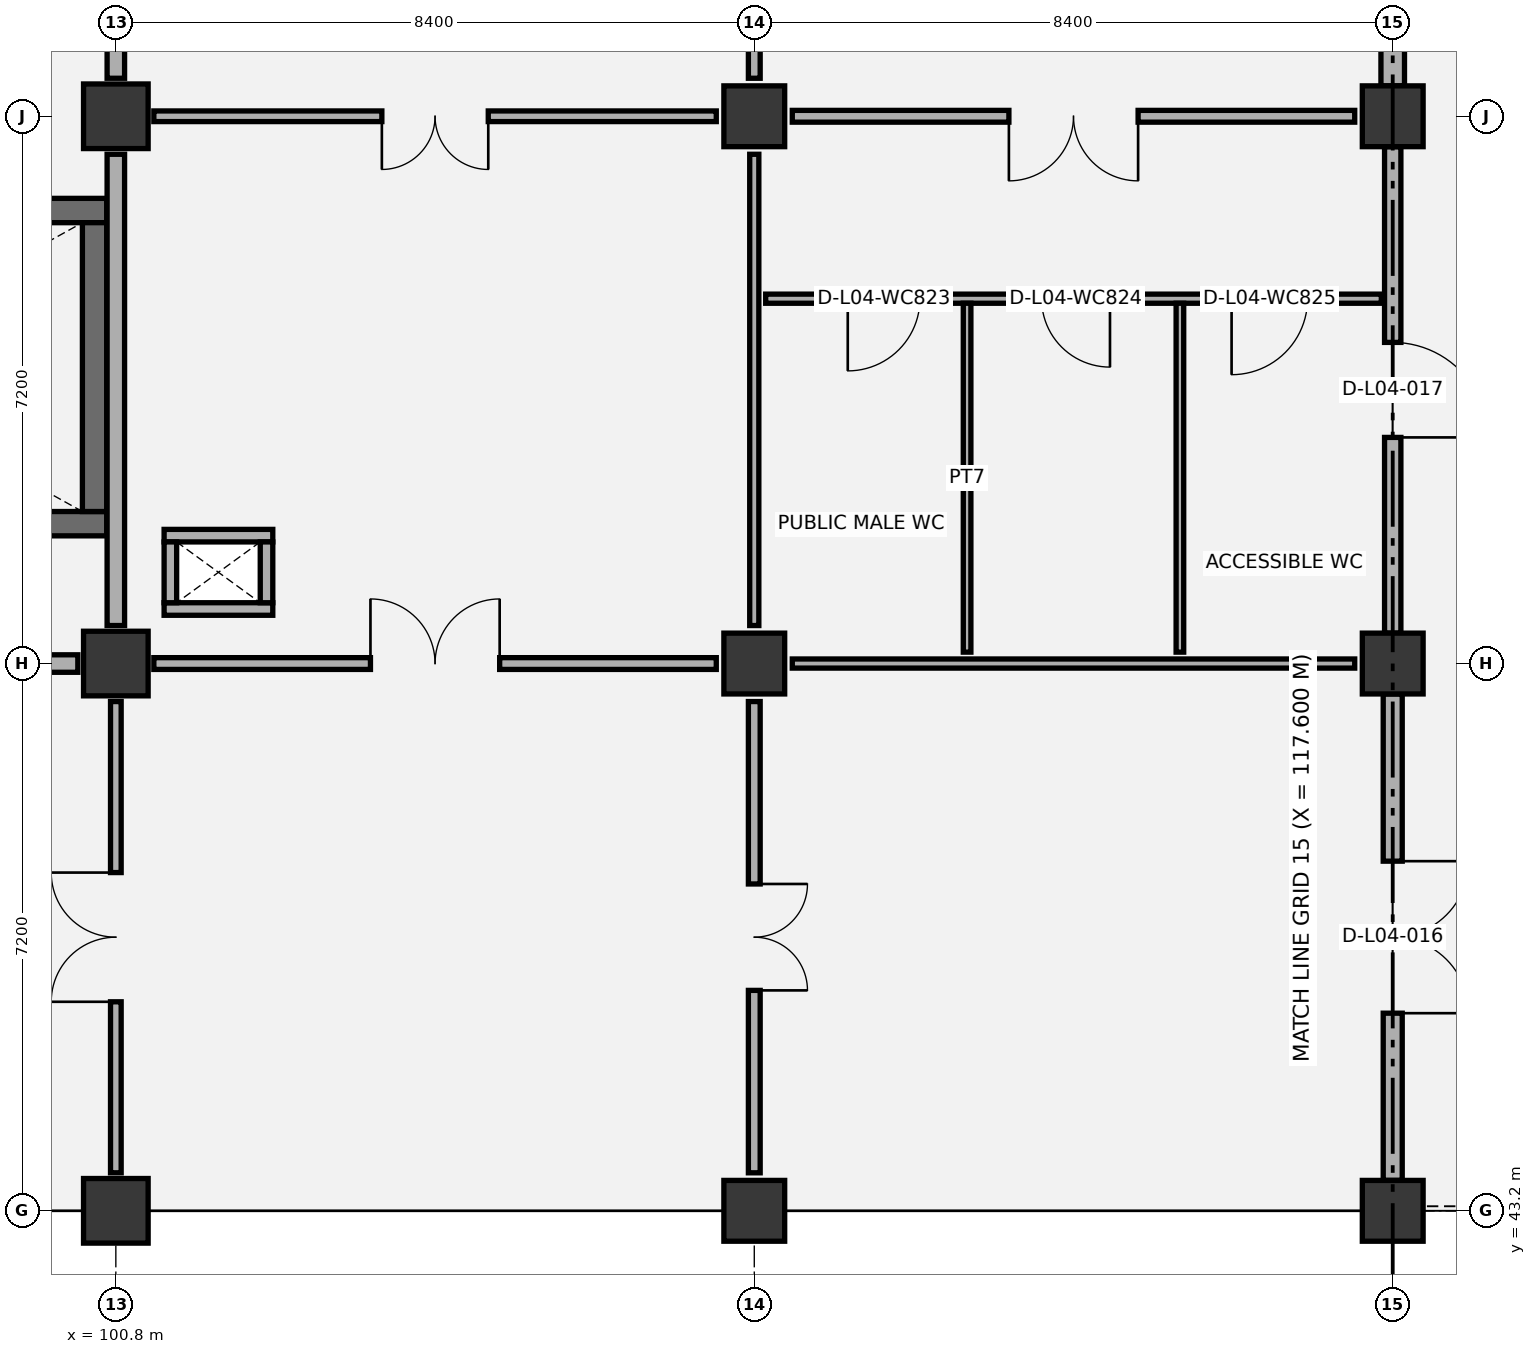
"""IFC4 building model, lengths in metres.
Left out: names, types, materials, properties, quantities, classifications, styles, units other than length and angle.
Written with IfcOpenShell. Run it as: python <this file> out.ifc"""

import sys

from ifc_helpers import new_model, si_unit, direction, frame, frame_2d, origin, origin_2d, place, context, subcontext, project, spatial, rectangle, extrude, element, fill, save


model = new_model("IFC4")
c1 = context("Model", 3, precision=1e-05, world=origin(), true_north=direction((0.0, 1.0)))
c2 = subcontext(c1, "Body", "Model", "MODEL_VIEW")
j1 = project(units=[si_unit("LENGTHUNIT", "METRE"), si_unit("PLANEANGLEUNIT", "RADIAN")], contexts=[c1])
p1 = place(None, origin())
s1 = spatial("IfcSite", under=j1, at=p1, CompositionType="ELEMENT")
p2 = place(p1, origin())
s2 = spatial("IfcBuilding", under=s1, at=p2, CompositionType="ELEMENT")
p3 = place(p2, frame((0.0, 0.0, 22.2)))
s3 = spatial("IfcBuildingStorey", under=s2, at=p3, CompositionType="ELEMENT", Elevation=22.2)
for number, where, z_axis, x_axis in (
    (1, (100.8, 43.2, 0.0), (0.0, 0.0, 1.0), (1.0, 0.0, 0.0)),
    (2, (100.8, 50.4, 0.0), (0.0, 0.0, 1.0), (1.0, 0.0, 0.0)),
    (3, (100.8, 57.6, 0.0), (0.0, 0.0, 1.0), (1.0, 0.0, 0.0)),
):
    element("IfcColumn", number, at=place(p3, frame(where, z_axis=z_axis, x_axis=x_axis)), inside=s3, PredefinedType="COLUMN", context=c2, shape_type="SweptSolid", body=[
        extrude(rectangle(XDim=0.85, YDim=0.85, at=origin_2d()), origin(), (0.0, 0.0, 1.0), 4.8),
    ])
for number, where, z_axis, x_axis in (
    (4, (109.2, 43.2, 0.0), (0.0, 0.0, 1.0), (1.0, 0.0, 0.0)),
    (5, (109.2, 50.4, 0.0), (0.0, 0.0, 1.0), (1.0, 0.0, 0.0)),
    (6, (109.2, 57.6, 0.0), (0.0, 0.0, 1.0), (1.0, 0.0, 0.0)),
    (7, (117.6, 43.2, 0.0), (0.0, 0.0, 1.0), (1.0, 0.0, 0.0)),
    (8, (117.6, 50.4, 0.0), (0.0, 0.0, 1.0), (1.0, 0.0, 0.0)),
    (9, (117.6, 57.6, 0.0), (0.0, 0.0, 1.0), (1.0, 0.0, 0.0)),
):
    element("IfcColumn", number, at=place(p3, frame(where, z_axis=z_axis, x_axis=x_axis)), inside=s3, PredefinedType="COLUMN", context=c2, shape_type="SweptSolid", body=[
        extrude(rectangle(XDim=0.8, YDim=0.8, at=origin_2d()), origin(), (0.0, 0.0, 1.0), 4.8),
    ])
p4 = place(p3, frame((93.2, 52.24, 0.0), z_axis=(0.0, 0.0, 1.0), x_axis=(1.0, 0.0, 0.0)))
e10 = element("IfcWall", 10, at=p4, inside=s3, PredefinedType="SHEAR", context=c2, shape_type="SweptSolid", body=[
    extrude(rectangle(XDim=7.48, YDim=0.32, at=frame_2d((3.74, 0.0))), origin(), (0.0, 0.0, 1.0), 4.52),
])
p5 = place(p4, frame((0.45, 0.0, 0.0)))
e11 = element("IfcOpeningElement", 11, at=p5, cuts=e10, PredefinedType="OPENING", context=c2, shape_type="SweptSolid", body=[
    extrude(rectangle(XDim=1.05, YDim=2.15, at=frame_2d((0.525, 1.075))), frame((0.0, 0.17, 0.0), z_axis=(0.0, -1.0, 0.0), x_axis=(1.0, 0.0, 0.0)), (0.0, 0.0, 1.0), 0.34),
])
p6 = place(p3, frame((93.2, 56.36, 0.0), z_axis=(0.0, 0.0, 1.0), x_axis=(1.0, 0.0, 0.0)))
e12 = element("IfcWall", 12, at=p6, inside=s3, PredefinedType="SHEAR", context=c2, shape_type="SweptSolid", body=[
    extrude(rectangle(XDim=7.48, YDim=0.32, at=frame_2d((3.74, 0.0))), origin(), (0.0, 0.0, 1.0), 4.52),
])
p7 = place(p3, frame((100.52, 52.4, 0.0), z_axis=(0.0, 0.0, 1.0), x_axis=(0.0, 1.0, 0.0)))
e13 = element("IfcWall", 13, at=p7, inside=s3, PredefinedType="SHEAR", context=c2, shape_type="SweptSolid", body=[
    extrude(rectangle(XDim=3.8, YDim=0.32, at=frame_2d((1.9, 0.0))), origin(), (0.0, 0.0, 1.0), 4.52),
])
p8 = place(p3, frame((117.6, 43.6, 0.0), z_axis=(0.0, 0.0, 1.0), x_axis=(0.0, 1.0, 0.0)))
e14 = element("IfcWall", 14, at=p8, inside=s3, PredefinedType="SOLIDWALL", context=c2, shape_type="SweptSolid", body=[
    extrude(rectangle(XDim=6.4, YDim=0.25, at=frame_2d((3.2, 0.0))), origin(), (0.0, 0.0, 1.0), 3.865),
])
p9 = place(p8, frame((2.2, 0.0, 0.0)))
e15 = element("IfcOpeningElement", 15, at=p9, cuts=e14, PredefinedType="OPENING", context=c2, shape_type="SweptSolid", body=[
    extrude(rectangle(XDim=2.0, YDim=2.4, at=frame_2d((1.0, 1.2))), frame((0.0, 0.135, 0.0), z_axis=(0.0, -1.0, 0.0), x_axis=(1.0, 0.0, 0.0)), (0.0, 0.0, 1.0), 0.27),
])
p10 = place(p3, frame((117.6, 50.8, 0.0), z_axis=(0.0, 0.0, 1.0), x_axis=(0.0, 1.0, 0.0)))
e16 = element("IfcWall", 16, at=p10, inside=s3, PredefinedType="SOLIDWALL", context=c2, shape_type="SweptSolid", body=[
    extrude(rectangle(XDim=6.4, YDim=0.215, at=frame_2d((3.2, 0.0))), origin(), (0.0, 0.0, 1.0), 3.865),
])
p11 = place(p10, frame((2.575, 0.0, 0.0)))
e17 = element("IfcOpeningElement", 17, at=p11, cuts=e16, PredefinedType="OPENING", context=c2, shape_type="SweptSolid", body=[
    extrude(rectangle(XDim=1.25, YDim=2.15, at=frame_2d((0.625, 1.075))), frame((0.0, 0.117, 0.0), z_axis=(0.0, -1.0, 0.0), x_axis=(1.0, 0.0, 0.0)), (0.0, 0.0, 1.0), 0.235),
])
p12 = place(p3, frame((117.6, 58.0, 0.0), z_axis=(0.0, 0.0, 1.0), x_axis=(0.0, 1.0, 0.0)))
e18 = element("IfcWall", 18, at=p12, inside=s3, PredefinedType="SOLIDWALL", context=c2, shape_type="SweptSolid", body=[
    extrude(rectangle(XDim=6.4, YDim=0.31, at=frame_2d((3.2, 0.0))), origin(), (0.0, 0.0, 1.0), 3.865),
])
for number, where, z_axis, x_axis in (
    (19, (101.435, 51.117, 0.0), (0.0, 0.0, 1.0), (1.0, 0.0, 0.0)),
    (20, (101.435, 52.083, 0.0), (0.0, 0.0, 1.0), (1.0, 0.0, 0.0)),
):
    element("IfcWall", number, at=place(p3, frame(where, z_axis=z_axis, x_axis=x_axis)), inside=s3, PredefinedType="PARTITIONING", context=c2, shape_type="SweptSolid", body=[
        extrude(rectangle(XDim=1.43, YDim=0.165, at=frame_2d((0.715, 0.0))), origin(), (0.0, 0.0, 1.0), 4.52),
    ])
for number, where, z_axis, x_axis in (
    (21, (101.518, 51.2, 0.0), (0.0, 0.0, 1.0), (0.0, 1.0, 0.0)),
    (22, (102.782, 51.2, 0.0), (0.0, 0.0, 1.0), (0.0, 1.0, 0.0)),
):
    element("IfcWall", number, at=place(p3, frame(where, z_axis=z_axis, x_axis=x_axis)), inside=s3, PredefinedType="PARTITIONING", context=c2, shape_type="SweptSolid", body=[
        extrude(rectangle(XDim=0.8, YDim=0.165, at=frame_2d((0.4, 0.0))), origin(), (0.0, 0.0, 1.0), 4.52),
    ])
p13 = place(p3, frame((109.35, 55.2, 0.0), z_axis=(0.0, 0.0, 1.0), x_axis=(1.0, 0.0, 0.0)))
e23 = element("IfcWall", 23, at=p13, inside=s3, PredefinedType="PARTITIONING", context=c2, shape_type="SweptSolid", body=[
    extrude(rectangle(XDim=8.1, YDim=0.12, at=frame_2d((4.05, 0.0))), origin(), (0.0, 0.0, 1.0), 4.52),
])
p14 = place(p13, frame((1.08, 0.0, 0.0)))
e24 = element("IfcOpeningElement", 24, at=p14, cuts=e23, PredefinedType="OPENING", context=c2, shape_type="SweptSolid", body=[
    extrude(rectangle(XDim=0.95, YDim=2.1, at=frame_2d((0.475, 1.05))), frame((0.0, 0.07, 0.0), z_axis=(0.0, -1.0, 0.0), x_axis=(1.0, 0.0, 0.0)), (0.0, 0.0, 1.0), 0.14),
])
p15 = place(p13, frame((3.63, 0.0, 0.0)))
e25 = element("IfcOpeningElement", 25, at=p15, cuts=e23, PredefinedType="OPENING", context=c2, shape_type="SweptSolid", body=[
    extrude(rectangle(XDim=0.9, YDim=2.1, at=frame_2d((0.45, 1.05))), frame((0.0, 0.07, 0.0), z_axis=(0.0, -1.0, 0.0), x_axis=(1.0, 0.0, 0.0)), (0.0, 0.0, 1.0), 0.14),
])
p16 = place(p13, frame((6.13, 0.0, 0.0)))
e26 = element("IfcOpeningElement", 26, at=p16, cuts=e23, PredefinedType="OPENING", context=c2, shape_type="SweptSolid", body=[
    extrude(rectangle(XDim=1.0, YDim=2.1, at=frame_2d((0.5, 1.05))), frame((0.0, 0.07, 0.0), z_axis=(0.0, -1.0, 0.0), x_axis=(1.0, 0.0, 0.0)), (0.0, 0.0, 1.0), 0.14),
])
for number, where, z_axis, x_axis in (
    (27, (112.0, 50.55, 0.0), (0.0, 0.0, 1.0), (0.0, 1.0, 0.0)),
    (28, (114.8, 50.55, 0.0), (0.0, 0.0, 1.0), (0.0, 1.0, 0.0)),
):
    element("IfcWall", number, at=place(p3, frame(where, z_axis=z_axis, x_axis=x_axis)), inside=s3, PredefinedType="PARTITIONING", context=c2, shape_type="SweptSolid", body=[
        extrude(rectangle(XDim=4.59, YDim=0.1, at=frame_2d((2.295, 0.0))), origin(), (0.0, 0.0, 1.0), 4.52),
    ])
p17 = place(p3, frame((100.8, 43.7, 0.0), z_axis=(0.0, 0.0, 1.0), x_axis=(0.0, 1.0, 0.0)))
e29 = element("IfcWall", 29, at=p17, inside=s3, PredefinedType="PARTITIONING", context=c2, shape_type="SweptSolid", body=[
    extrude(rectangle(XDim=6.2, YDim=0.14, at=frame_2d((3.1, 0.0))), origin(), (0.0, 0.0, 1.0), 4.015),
])
p18 = place(p17, frame((2.25, 0.0, 0.0)))
e30 = element("IfcOpeningElement", 30, at=p18, cuts=e29, PredefinedType="OPENING", context=c2, shape_type="SweptSolid", body=[
    extrude(rectangle(XDim=1.7, YDim=2.25, at=frame_2d((0.85, 1.125))), frame((0.0, 0.08, 0.0), z_axis=(0.0, -1.0, 0.0), x_axis=(1.0, 0.0, 0.0)), (0.0, 0.0, 1.0), 0.16),
])
p19 = place(p3, frame((92.9, 50.4, 0.0), z_axis=(0.0, 0.0, 1.0), x_axis=(1.0, 0.0, 0.0)))
e31 = element("IfcWall", 31, at=p19, inside=s3, PredefinedType="PARTITIONING", context=c2, shape_type="SweptSolid", body=[
    extrude(rectangle(XDim=7.4, YDim=0.23, at=frame_2d((3.7, 0.0))), origin(), (0.0, 0.0, 1.0), 3.815),
])
p20 = place(p19, frame((2.95, 0.0, 0.0)))
e32 = element("IfcOpeningElement", 32, at=p20, cuts=e31, PredefinedType="OPENING", context=c2, shape_type="SweptSolid", body=[
    extrude(rectangle(XDim=1.5, YDim=2.15, at=frame_2d((0.75, 1.075))), frame((0.0, 0.125, 0.0), z_axis=(0.0, -1.0, 0.0), x_axis=(1.0, 0.0, 0.0)), (0.0, 0.0, 1.0), 0.25),
])
p21 = place(p3, frame((100.8, 50.9, 0.0), z_axis=(0.0, 0.0, 1.0), x_axis=(0.0, 1.0, 0.0)))
e33 = element("IfcWall", 33, at=p21, inside=s3, PredefinedType="PARTITIONING", context=c2, shape_type="SweptSolid", body=[
    extrude(rectangle(XDim=6.2, YDim=0.23, at=frame_2d((3.1, 0.0))), origin(), (0.0, 0.0, 1.0), 3.865),
])
p22 = place(p3, frame((100.8, 58.1, 0.0), z_axis=(0.0, 0.0, 1.0), x_axis=(0.0, 1.0, 0.0)))
e34 = element("IfcWall", 34, at=p22, inside=s3, PredefinedType="PARTITIONING", context=c2, shape_type="SweptSolid", body=[
    extrude(rectangle(XDim=6.2, YDim=0.23, at=frame_2d((3.1, 0.0))), origin(), (0.0, 0.0, 1.0), 4.115),
])
p23 = place(p3, frame((109.2, 43.7, 0.0), z_axis=(0.0, 0.0, 1.0), x_axis=(0.0, 1.0, 0.0)))
e35 = element("IfcWall", 35, at=p23, inside=s3, PredefinedType="PARTITIONING", context=c2, shape_type="SweptSolid", body=[
    extrude(rectangle(XDim=6.2, YDim=0.155, at=frame_2d((3.1, 0.0))), origin(), (0.0, 0.0, 1.0), 3.865),
])
p24 = place(p23, frame((2.4, 0.0, 0.0)))
e36 = element("IfcOpeningElement", 36, at=p24, cuts=e35, PredefinedType="OPENING", context=c2, shape_type="SweptSolid", body=[
    extrude(rectangle(XDim=1.4, YDim=2.15, at=frame_2d((0.7, 1.075))), frame((0.0, 0.087, 0.0), z_axis=(0.0, -1.0, 0.0), x_axis=(1.0, 0.0, 0.0)), (0.0, 0.0, 1.0), 0.175),
])
p25 = place(p3, frame((101.3, 50.4, 0.0), z_axis=(0.0, 0.0, 1.0), x_axis=(1.0, 0.0, 0.0)))
e37 = element("IfcWall", 37, at=p25, inside=s3, PredefinedType="PARTITIONING", context=c2, shape_type="SweptSolid", body=[
    extrude(rectangle(XDim=7.4, YDim=0.155, at=frame_2d((3.7, 0.0))), origin(), (0.0, 0.0, 1.0), 3.815),
])
p26 = place(p25, frame((2.85, 0.0, 0.0)))
e38 = element("IfcOpeningElement", 38, at=p26, cuts=e37, PredefinedType="OPENING", context=c2, shape_type="SweptSolid", body=[
    extrude(rectangle(XDim=1.7, YDim=2.25, at=frame_2d((0.85, 1.125))), frame((0.0, 0.087, 0.0), z_axis=(0.0, -1.0, 0.0), x_axis=(1.0, 0.0, 0.0)), (0.0, 0.0, 1.0), 0.175),
])
p27 = place(p3, frame((109.2, 50.9, 0.0), z_axis=(0.0, 0.0, 1.0), x_axis=(0.0, 1.0, 0.0)))
e39 = element("IfcWall", 39, at=p27, inside=s3, PredefinedType="PARTITIONING", context=c2, shape_type="SweptSolid", body=[
    extrude(rectangle(XDim=6.2, YDim=0.12, at=frame_2d((3.1, 0.0))), origin(), (0.0, 0.0, 1.0), 4.115),
])
p28 = place(p3, frame((101.3, 57.6, 0.0), z_axis=(0.0, 0.0, 1.0), x_axis=(1.0, 0.0, 0.0)))
e40 = element("IfcWall", 40, at=p28, inside=s3, PredefinedType="PARTITIONING", context=c2, shape_type="SweptSolid", body=[
    extrude(rectangle(XDim=7.4, YDim=0.14, at=frame_2d((3.7, 0.0))), origin(), (0.0, 0.0, 1.0), 3.815),
])
p29 = place(p28, frame((3.0, 0.0, 0.0)))
e41 = element("IfcOpeningElement", 41, at=p29, cuts=e40, PredefinedType="OPENING", context=c2, shape_type="SweptSolid", body=[
    extrude(rectangle(XDim=1.4, YDim=2.15, at=frame_2d((0.7, 1.075))), frame((0.0, 0.08, 0.0), z_axis=(0.0, -1.0, 0.0), x_axis=(1.0, 0.0, 0.0)), (0.0, 0.0, 1.0), 0.16),
])
p30 = place(p3, frame((109.2, 58.1, 0.0), z_axis=(0.0, 0.0, 1.0), x_axis=(0.0, 1.0, 0.0)))
e42 = element("IfcWall", 42, at=p30, inside=s3, PredefinedType="PARTITIONING", context=c2, shape_type="SweptSolid", body=[
    extrude(rectangle(XDim=6.2, YDim=0.155, at=frame_2d((3.1, 0.0))), origin(), (0.0, 0.0, 1.0), 3.865),
])
p31 = place(p30, frame((2.25, 0.0, 0.0)))
e43 = element("IfcOpeningElement", 43, at=p31, cuts=e42, PredefinedType="OPENING", context=c2, shape_type="SweptSolid", body=[
    extrude(rectangle(XDim=1.7, YDim=2.25, at=frame_2d((0.85, 1.125))), frame((0.0, 0.087, 0.0), z_axis=(0.0, -1.0, 0.0), x_axis=(1.0, 0.0, 0.0)), (0.0, 0.0, 1.0), 0.175),
])
p32 = place(p3, frame((109.7, 50.4, 0.0), z_axis=(0.0, 0.0, 1.0), x_axis=(1.0, 0.0, 0.0)))
e44 = element("IfcWall", 44, at=p32, inside=s3, PredefinedType="PARTITIONING", context=c2, shape_type="SweptSolid", body=[
    extrude(rectangle(XDim=7.4, YDim=0.12, at=frame_2d((3.7, 0.0))), origin(), (0.0, 0.0, 1.0), 3.815),
])
p33 = place(p3, frame((109.7, 57.6, 0.0), z_axis=(0.0, 0.0, 1.0), x_axis=(1.0, 0.0, 0.0)))
e45 = element("IfcWall", 45, at=p33, inside=s3, PredefinedType="PARTITIONING", context=c2, shape_type="SweptSolid", body=[
    extrude(rectangle(XDim=7.4, YDim=0.155, at=frame_2d((3.7, 0.0))), origin(), (0.0, 0.0, 1.0), 3.815),
])
p34 = place(p33, frame((2.85, 0.0, 0.0)))
e46 = element("IfcOpeningElement", 46, at=p34, cuts=e45, PredefinedType="OPENING", context=c2, shape_type="SweptSolid", body=[
    extrude(rectangle(XDim=1.7, YDim=2.25, at=frame_2d((0.85, 1.125))), frame((0.0, 0.087, 0.0), z_axis=(0.0, -1.0, 0.0), x_axis=(1.0, 0.0, 0.0)), (0.0, 0.0, 1.0), 0.175),
])
p35 = place(p9, frame((2.0, 0.0, 0.0), z_axis=(0.0, 0.0, 1.0), x_axis=(-1.0, 0.0, 0.0)))
e47 = element("IfcDoor", 47, at=p35, inside=s3, OperationType="DOUBLE_DOOR_SINGLE_SWING", PredefinedType="DOOR", context=c2, shape_type="SweptSolid", body=[
    extrude(rectangle(XDim=2.0, YDim=2.4, at=frame_2d((1.0, 1.2))), frame((0.0, 0.025, 0.0), z_axis=(0.0, -1.0, 0.0), x_axis=(1.0, 0.0, 0.0)), (0.0, 0.0, 1.0), 0.05),
])
fill(e15, e47)
p36 = place(p11, frame((1.25, 0.0, 0.0), z_axis=(0.0, 0.0, 1.0), x_axis=(-1.0, 0.0, 0.0)))
e48 = element("IfcDoor", 48, at=p36, inside=s3, OperationType="SINGLE_SWING_RIGHT", PredefinedType="DOOR", context=c2, shape_type="SweptSolid", body=[
    extrude(rectangle(XDim=1.25, YDim=2.15, at=frame_2d((0.625, 1.075))), frame((0.0, 0.025, 0.0), z_axis=(0.0, -1.0, 0.0), x_axis=(1.0, 0.0, 0.0)), (0.0, 0.0, 1.0), 0.05),
])
fill(e17, e48)
p37 = place(p14, frame((0.95, 0.0, 0.0), z_axis=(0.0, 0.0, 1.0), x_axis=(-1.0, 0.0, 0.0)))
e49 = element("IfcDoor", 49, at=p37, inside=s3, OperationType="SINGLE_SWING_RIGHT", PredefinedType="DOOR", context=c2, shape_type="SweptSolid", body=[
    extrude(rectangle(XDim=0.95, YDim=2.1, at=frame_2d((0.475, 1.05))), frame((0.0, 0.025, 0.0), z_axis=(0.0, -1.0, 0.0), x_axis=(1.0, 0.0, 0.0)), (0.0, 0.0, 1.0), 0.05),
])
fill(e24, e49)
p38 = place(p15, frame((0.9, 0.0, 0.0), z_axis=(0.0, 0.0, 1.0), x_axis=(-1.0, 0.0, 0.0)))
e50 = element("IfcDoor", 50, at=p38, inside=s3, OperationType="SINGLE_SWING_LEFT", PredefinedType="DOOR", context=c2, shape_type="SweptSolid", body=[
    extrude(rectangle(XDim=0.9, YDim=2.1, at=frame_2d((0.45, 1.05))), frame((0.0, 0.025, 0.0), z_axis=(0.0, -1.0, 0.0), x_axis=(1.0, 0.0, 0.0)), (0.0, 0.0, 1.0), 0.05),
])
fill(e25, e50)
p39 = place(p16, frame((1.0, 0.0, 0.0), z_axis=(0.0, 0.0, 1.0), x_axis=(-1.0, 0.0, 0.0)))
e51 = element("IfcDoor", 51, at=p39, inside=s3, OperationType="SINGLE_SWING_RIGHT", PredefinedType="DOOR", context=c2, shape_type="SweptSolid", body=[
    extrude(rectangle(XDim=1.0, YDim=2.1, at=frame_2d((0.5, 1.05))), frame((0.0, 0.025, 0.0), z_axis=(0.0, -1.0, 0.0), x_axis=(1.0, 0.0, 0.0)), (0.0, 0.0, 1.0), 0.05),
])
fill(e26, e51)
p40 = place(p18, origin())
e52 = element("IfcDoor", 52, at=p40, inside=s3, OperationType="DOUBLE_DOOR_SINGLE_SWING", PredefinedType="DOOR", context=c2, shape_type="SweptSolid", body=[
    extrude(rectangle(XDim=1.7, YDim=2.25, at=frame_2d((0.85, 1.125))), frame((0.0, 0.025, 0.0), z_axis=(0.0, -1.0, 0.0), x_axis=(1.0, 0.0, 0.0)), (0.0, 0.0, 1.0), 0.05),
])
fill(e30, e52)
p41 = place(p24, frame((1.4, 0.0, 0.0), z_axis=(0.0, 0.0, 1.0), x_axis=(-1.0, 0.0, 0.0)))
e53 = element("IfcDoor", 53, at=p41, inside=s3, OperationType="DOUBLE_DOOR_SINGLE_SWING", PredefinedType="DOOR", context=c2, shape_type="SweptSolid", body=[
    extrude(rectangle(XDim=1.4, YDim=2.15, at=frame_2d((0.7, 1.075))), frame((0.0, 0.025, 0.0), z_axis=(0.0, -1.0, 0.0), x_axis=(1.0, 0.0, 0.0)), (0.0, 0.0, 1.0), 0.05),
])
fill(e36, e53)
p42 = place(p26, origin())
e54 = element("IfcDoor", 54, at=p42, inside=s3, OperationType="DOUBLE_DOOR_SINGLE_SWING", PredefinedType="DOOR", context=c2, shape_type="SweptSolid", body=[
    extrude(rectangle(XDim=1.7, YDim=2.25, at=frame_2d((0.85, 1.125))), frame((0.0, 0.025, 0.0), z_axis=(0.0, -1.0, 0.0), x_axis=(1.0, 0.0, 0.0)), (0.0, 0.0, 1.0), 0.05),
])
fill(e38, e54)
p43 = place(p29, frame((1.4, 0.0, 0.0), z_axis=(0.0, 0.0, 1.0), x_axis=(-1.0, 0.0, 0.0)))
e55 = element("IfcDoor", 55, at=p43, inside=s3, OperationType="DOUBLE_DOOR_SINGLE_SWING", PredefinedType="DOOR", context=c2, shape_type="SweptSolid", body=[
    extrude(rectangle(XDim=1.4, YDim=2.15, at=frame_2d((0.7, 1.075))), frame((0.0, 0.025, 0.0), z_axis=(0.0, -1.0, 0.0), x_axis=(1.0, 0.0, 0.0)), (0.0, 0.0, 1.0), 0.05),
])
fill(e41, e55)
p44 = place(p34, frame((1.7, 0.0, 0.0), z_axis=(0.0, 0.0, 1.0), x_axis=(-1.0, 0.0, 0.0)))
e56 = element("IfcDoor", 56, at=p44, inside=s3, OperationType="DOUBLE_DOOR_SINGLE_SWING", PredefinedType="DOOR", context=c2, shape_type="SweptSolid", body=[
    extrude(rectangle(XDim=1.7, YDim=2.25, at=frame_2d((0.85, 1.125))), frame((0.0, 0.025, 0.0), z_axis=(0.0, -1.0, 0.0), x_axis=(1.0, 0.0, 0.0)), (0.0, 0.0, 1.0), 0.05),
])
fill(e46, e56)
save(model, sys.argv[1])
